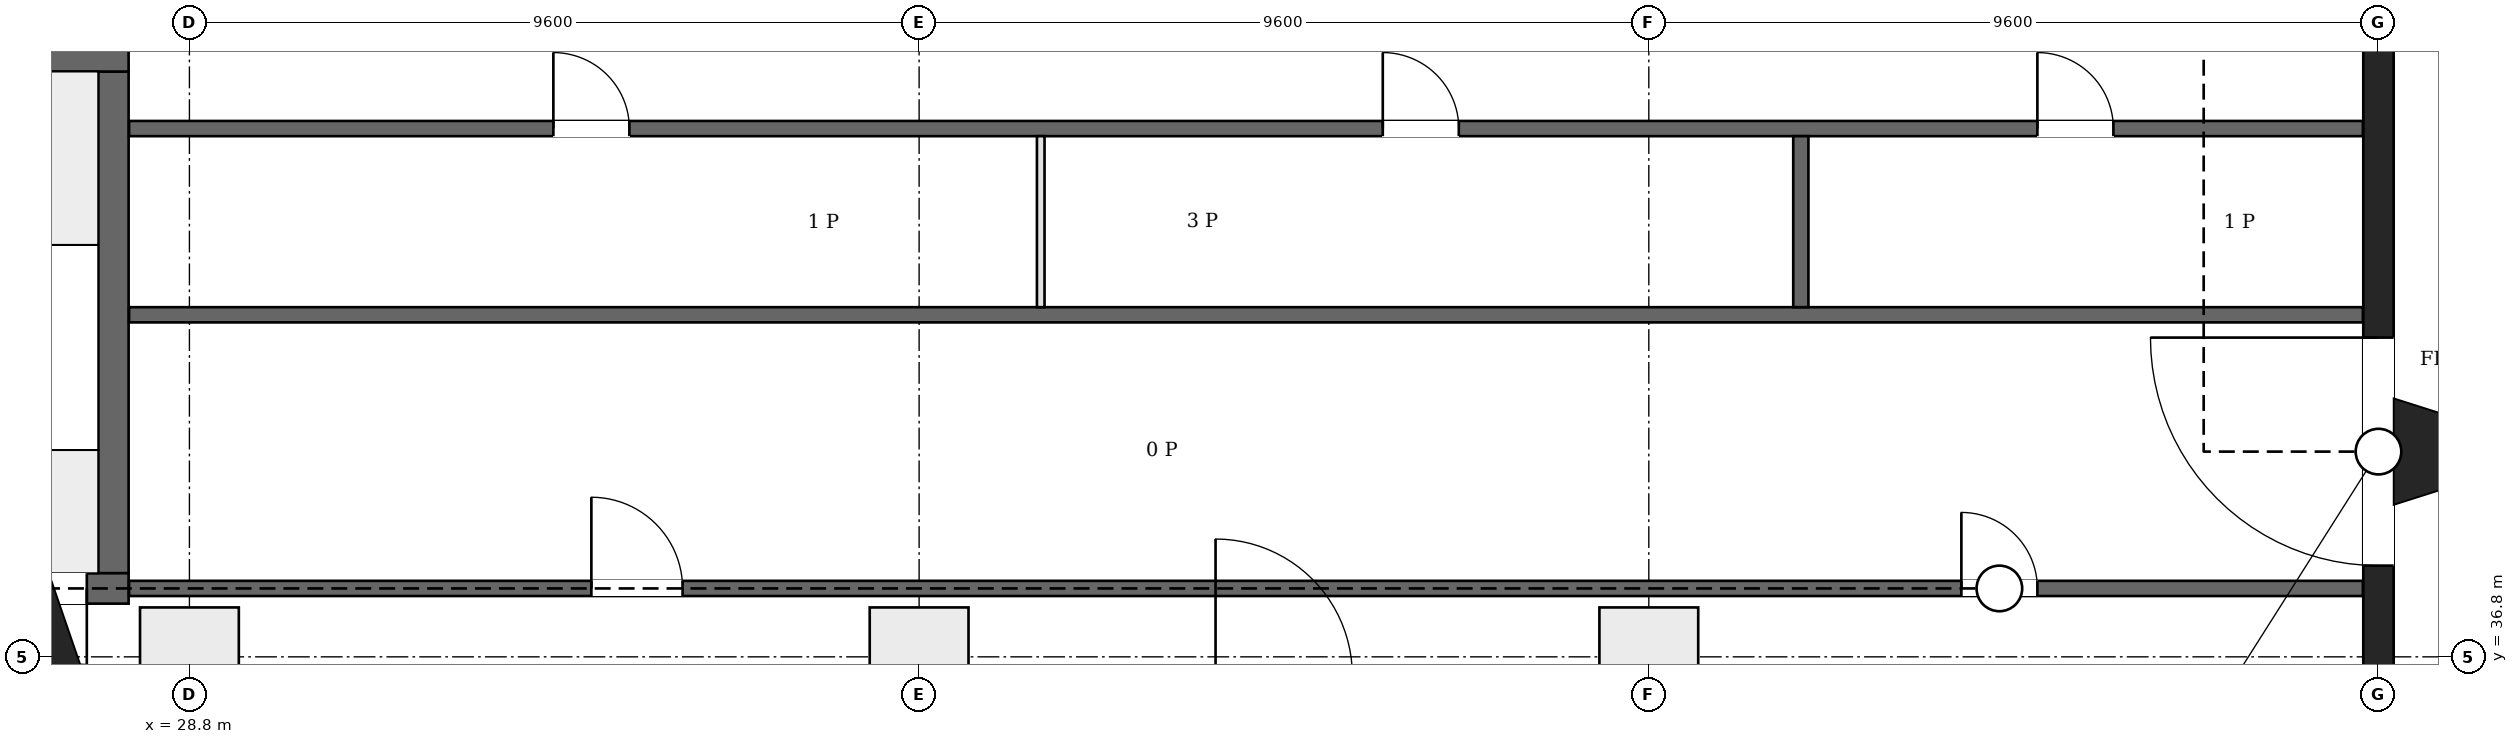
"""IFC4 building model, lengths in metres.
Left out: names, types, materials, properties, quantities, classifications, styles, units other than length and angle.
Written with IfcOpenShell. Run it as: python <this file> out.ifc"""

import sys

from ifc_helpers import new_model, si_unit, direction, frame, frame_2d, origin, origin_2d, place, context, subcontext, project, spatial, rectangle, extrude, element, fill, save


model = new_model("IFC4")
c1 = context("Model", 3, precision=1e-05, world=origin(), true_north=direction((0.0, 1.0)))
c2 = subcontext(c1, "Body", "Model", "MODEL_VIEW")
j1 = project(units=[si_unit("LENGTHUNIT", "METRE"), si_unit("PLANEANGLEUNIT", "RADIAN")], contexts=[c1])
p1 = place(None, origin())
s1 = spatial("IfcSite", under=j1, at=p1, CompositionType="ELEMENT")
p2 = place(p1, origin())
s2 = spatial("IfcBuilding", under=s1, at=p2, CompositionType="ELEMENT")
p3 = place(p2, origin())
s3 = spatial("IfcBuildingStorey", under=s2, at=p3, CompositionType="ELEMENT", Elevation=0.0)
p4 = place(p3, frame((57.6, -0.2, 0.0), z_axis=(0.0, 0.0, 1.0), x_axis=(0.0, 1.0, 0.0)))
e1 = element("IfcWall", 1, at=p4, inside=s3, PredefinedType="SHEAR", context=c2, shape_type="SweptSolid", body=[
    extrude(rectangle(XDim=46.88, YDim=0.4, at=frame_2d((23.44, 0.0))), origin(), (0.0, 0.0, 1.0), 6.5),
])
p5 = place(p4, frame((11.65, 0.0, 0.0)))
e2 = element("IfcOpeningElement", 2, at=p5, cuts=e1, PredefinedType="OPENING", context=c2, shape_type="SweptSolid", body=[
    extrude(rectangle(XDim=3.0, YDim=2.4, at=frame_2d((1.5, 1.2))), frame((0.0, 0.21, 0.0), z_axis=(0.0, -1.0, 0.0), x_axis=(1.0, 0.0, 0.0)), (0.0, 0.0, 1.0), 0.42),
])
p6 = place(p4, frame((38.2, 0.0, 0.0)))
e3 = element("IfcOpeningElement", 3, at=p6, cuts=e1, PredefinedType="OPENING", context=c2, shape_type="SweptSolid", body=[
    extrude(rectangle(XDim=3.0, YDim=2.4, at=frame_2d((1.5, 1.2))), frame((0.0, 0.21, 0.0), z_axis=(0.0, -1.0, 0.0), x_axis=(1.0, 0.0, 0.0)), (0.0, 0.0, 1.0), 0.42),
])
p7 = place(p3, frame((23.8, 37.7, 0.0), z_axis=(0.0, 0.0, 1.0), x_axis=(1.0, 0.0, 0.0)))
e4 = element("IfcWall", 4, at=p7, inside=s3, PredefinedType="SHEAR", context=c2, shape_type="SweptSolid", body=[
    extrude(rectangle(XDim=4.2, YDim=0.4, at=frame_2d((2.1, 0.0))), origin(), (0.0, 0.0, 1.0), 6.5),
])
p8 = place(p7, frame((0.55, 0.0, 0.0)))
e5 = element("IfcOpeningElement", 5, at=p8, cuts=e4, PredefinedType="OPENING", context=c2, shape_type="SweptSolid", body=[
    extrude(rectangle(XDim=1.0, YDim=2.1, at=frame_2d((0.5, 1.05))), frame((0.0, 0.21, 0.0), z_axis=(0.0, -1.0, 0.0), x_axis=(1.0, 0.0, 0.0)), (0.0, 0.0, 1.0), 0.42),
])
p9 = place(p7, frame((2.65, 0.0, 0.0)))
e6 = element("IfcOpeningElement", 6, at=p9, cuts=e4, PredefinedType="OPENING", context=c2, shape_type="SweptSolid", body=[
    extrude(rectangle(XDim=1.0, YDim=2.1, at=frame_2d((0.5, 1.05))), frame((0.0, 0.21, 0.0), z_axis=(0.0, -1.0, 0.0), x_axis=(1.0, 0.0, 0.0)), (0.0, 0.0, 1.0), 0.42),
])
p10 = place(p3, frame((23.8, 44.7, 0.0), z_axis=(0.0, 0.0, 1.0), x_axis=(1.0, 0.0, 0.0)))
e7 = element("IfcWall", 7, at=p10, inside=s3, PredefinedType="SHEAR", context=c2, shape_type="SweptSolid", body=[
    extrude(rectangle(XDim=4.2, YDim=0.4, at=frame_2d((2.1, 0.0))), origin(), (0.0, 0.0, 1.0), 6.5),
])
p11 = place(p3, frame((27.8, 37.9, 0.0), z_axis=(0.0, 0.0, 1.0), x_axis=(0.0, 1.0, 0.0)))
e8 = element("IfcWall", 8, at=p11, inside=s3, PredefinedType="SHEAR", context=c2, shape_type="SweptSolid", body=[
    extrude(rectangle(XDim=6.6, YDim=0.4, at=frame_2d((3.3, 0.0))), origin(), (0.0, 0.0, 1.0), 6.5),
])
for number, where, z_axis, x_axis in (
    (9, (28.8, 36.8, 0.0), (0.0, 0.0, 1.0), (1.0, 0.0, 0.0)),
    (10, (38.4, 36.8, 0.0), (0.0, 0.0, 1.0), (1.0, 0.0, 0.0)),
    (11, (48.0, 36.8, 0.0), (0.0, 0.0, 1.0), (1.0, 0.0, 0.0)),
):
    element("IfcColumn", number, at=place(p3, frame(where, z_axis=z_axis, x_axis=x_axis)), inside=s3, PredefinedType="COLUMN", context=c2, shape_type="SweptSolid", body=[
        extrude(rectangle(XDim=1.3, YDim=1.3, at=origin_2d()), origin(), (0.0, 0.0, 1.0), 6.5),
    ])
p12 = place(p3, frame((28.006, 37.7, 0.0), z_axis=(0.0, 0.0, 1.0), x_axis=(1.0, 0.0, 0.0)))
e12 = element("IfcWall", 12, at=p12, inside=s3, PredefinedType="PARTITIONING", context=c2, shape_type="SweptSolid", body=[
    extrude(rectangle(XDim=29.388, YDim=0.2, at=frame_2d((14.694, 0.0))), origin(), (0.0, 0.0, 1.0), 6.15),
])
p13 = place(p12, frame((24.106, 0.0, 0.0)))
e13 = element("IfcOpeningElement", 13, at=p13, cuts=e12, PredefinedType="OPENING", context=c2, shape_type="SweptSolid", body=[
    extrude(rectangle(XDim=1.0, YDim=2.1, at=frame_2d((0.5, 1.05))), frame((0.0, 0.11, 0.0), z_axis=(0.0, -1.0, 0.0), x_axis=(1.0, 0.0, 0.0)), (0.0, 0.0, 1.0), 0.22),
])
p14 = place(p12, frame((6.082, 0.0, 0.0)))
e14 = element("IfcOpeningElement", 14, at=p14, cuts=e12, PredefinedType="OPENING", context=c2, shape_type="SweptSolid", body=[
    extrude(rectangle(XDim=1.2, YDim=2.1, at=frame_2d((0.6, 1.05))), frame((0.0, 0.11, 0.0), z_axis=(0.0, -1.0, 0.0), x_axis=(1.0, 0.0, 0.0)), (0.0, 0.0, 1.0), 0.22),
])
p15 = place(p3, frame((28.006, 41.3, 0.0), z_axis=(0.0, 0.0, 1.0), x_axis=(1.0, 0.0, 0.0)))
e15 = element("IfcWall", 15, at=p15, inside=s3, PredefinedType="PARTITIONING", context=c2, shape_type="SweptSolid", body=[
    extrude(rectangle(XDim=29.388, YDim=0.2, at=frame_2d((14.694, 0.0))), origin(), (0.0, 0.0, 1.0), 6.15),
])
p16 = place(p3, frame((28.006, 43.75, 0.0), z_axis=(0.0, 0.0, 1.0), x_axis=(1.0, 0.0, 0.0)))
e16 = element("IfcWall", 16, at=p16, inside=s3, PredefinedType="PARTITIONING", context=c2, shape_type="SweptSolid", body=[
    extrude(rectangle(XDim=29.388, YDim=0.2, at=frame_2d((14.694, 0.0))), origin(), (0.0, 0.0, 1.0), 6.15),
])
p17 = place(p16, frame((5.582, 0.0, 0.0)))
e17 = element("IfcOpeningElement", 17, at=p17, cuts=e16, PredefinedType="OPENING", context=c2, shape_type="SweptSolid", body=[
    extrude(rectangle(XDim=1.0, YDim=2.1, at=frame_2d((0.5, 1.05))), frame((0.0, 0.11, 0.0), z_axis=(0.0, -1.0, 0.0), x_axis=(1.0, 0.0, 0.0)), (0.0, 0.0, 1.0), 0.22),
])
p18 = place(p16, frame((16.494, 0.0, 0.0)))
e18 = element("IfcOpeningElement", 18, at=p18, cuts=e16, PredefinedType="OPENING", context=c2, shape_type="SweptSolid", body=[
    extrude(rectangle(XDim=1.0, YDim=2.1, at=frame_2d((0.5, 1.05))), frame((0.0, 0.11, 0.0), z_axis=(0.0, -1.0, 0.0), x_axis=(1.0, 0.0, 0.0)), (0.0, 0.0, 1.0), 0.22),
])
p19 = place(p16, frame((25.106, 0.0, 0.0)))
e19 = element("IfcOpeningElement", 19, at=p19, cuts=e16, PredefinedType="OPENING", context=c2, shape_type="SweptSolid", body=[
    extrude(rectangle(XDim=1.0, YDim=2.1, at=frame_2d((0.5, 1.05))), frame((0.0, 0.11, 0.0), z_axis=(0.0, -1.0, 0.0), x_axis=(1.0, 0.0, 0.0)), (0.0, 0.0, 1.0), 0.22),
])
p20 = place(p3, frame((40.0, 41.4, 0.0), z_axis=(0.0, 0.0, 1.0), x_axis=(0.0, 1.0, 0.0)))
e20 = element("IfcWall", 20, at=p20, inside=s3, PredefinedType="PARTITIONING", context=c2, shape_type="SweptSolid", body=[
    extrude(rectangle(XDim=2.25, YDim=0.1, at=frame_2d((1.125, 0.0))), origin(), (0.0, 0.0, 1.0), 6.15),
])
p21 = place(p3, frame((50.0, 41.4, 0.0), z_axis=(0.0, 0.0, 1.0), x_axis=(0.0, 1.0, 0.0)))
e21 = element("IfcWall", 21, at=p21, inside=s3, PredefinedType="PARTITIONING", context=c2, shape_type="SweptSolid", body=[
    extrude(rectangle(XDim=2.25, YDim=0.2, at=frame_2d((1.125, 0.0))), origin(), (0.0, 0.0, 1.0), 6.15),
])
p22 = place(p6, frame((3.0, 0.0, 0.0), z_axis=(0.0, 0.0, 1.0), x_axis=(-1.0, 0.0, 0.0)))
e22 = element("IfcDoor", 22, at=p22, inside=s3, OperationType="DOUBLE_DOOR_SINGLE_SWING", PredefinedType="DOOR", context=c2, shape_type="SweptSolid", body=[
    extrude(rectangle(XDim=3.0, YDim=2.4, at=frame_2d((1.5, 1.2))), frame((0.0, 0.025, 0.0), z_axis=(0.0, -1.0, 0.0), x_axis=(1.0, 0.0, 0.0)), (0.0, 0.0, 1.0), 0.05),
])
fill(e3, e22)
p23 = place(p9, origin())
e23 = element("IfcDoor", 23, at=p23, inside=s3, OperationType="SINGLE_SWING_RIGHT", PredefinedType="DOOR", context=c2, shape_type="SweptSolid", body=[
    extrude(rectangle(XDim=1.0, YDim=2.1, at=frame_2d((0.5, 1.05))), frame((0.0, 0.025, 0.0), z_axis=(0.0, -1.0, 0.0), x_axis=(1.0, 0.0, 0.0)), (0.0, 0.0, 1.0), 0.05),
])
fill(e6, e23)
p24 = place(p13, origin())
e24 = element("IfcDoor", 24, at=p24, inside=s3, OperationType="SINGLE_SWING_RIGHT", PredefinedType="DOOR", context=c2, shape_type="SweptSolid", body=[
    extrude(rectangle(XDim=1.0, YDim=2.1, at=frame_2d((0.5, 1.05))), frame((0.0, 0.025, 0.0), z_axis=(0.0, -1.0, 0.0), x_axis=(1.0, 0.0, 0.0)), (0.0, 0.0, 1.0), 0.05),
])
fill(e13, e24)
p25 = place(p17, origin())
e25 = element("IfcDoor", 25, at=p25, inside=s3, OperationType="SINGLE_SWING_RIGHT", PredefinedType="DOOR", context=c2, shape_type="SweptSolid", body=[
    extrude(rectangle(XDim=1.0, YDim=2.1, at=frame_2d((0.5, 1.05))), frame((0.0, 0.025, 0.0), z_axis=(0.0, -1.0, 0.0), x_axis=(1.0, 0.0, 0.0)), (0.0, 0.0, 1.0), 0.05),
])
fill(e17, e25)
p26 = place(p18, origin())
e26 = element("IfcDoor", 26, at=p26, inside=s3, OperationType="SINGLE_SWING_LEFT", PredefinedType="DOOR", context=c2, shape_type="SweptSolid", body=[
    extrude(rectangle(XDim=1.0, YDim=2.1, at=frame_2d((0.5, 1.05))), frame((0.0, 0.025, 0.0), z_axis=(0.0, -1.0, 0.0), x_axis=(1.0, 0.0, 0.0)), (0.0, 0.0, 1.0), 0.05),
])
fill(e18, e26)
p27 = place(p19, origin())
e27 = element("IfcDoor", 27, at=p27, inside=s3, OperationType="SINGLE_SWING_RIGHT", PredefinedType="DOOR", context=c2, shape_type="SweptSolid", body=[
    extrude(rectangle(XDim=1.0, YDim=2.1, at=frame_2d((0.5, 1.05))), frame((0.0, 0.025, 0.0), z_axis=(0.0, -1.0, 0.0), x_axis=(1.0, 0.0, 0.0)), (0.0, 0.0, 1.0), 0.05),
])
fill(e19, e27)
p28 = place(p14, origin())
e28 = element("IfcDoor", 28, at=p28, inside=s3, OperationType="SINGLE_SWING_LEFT", PredefinedType="DOOR", context=c2, shape_type="SweptSolid", body=[
    extrude(rectangle(XDim=1.2, YDim=2.1, at=frame_2d((0.6, 1.05))), frame((0.0, 0.025, 0.0), z_axis=(0.0, -1.0, 0.0), x_axis=(1.0, 0.0, 0.0)), (0.0, 0.0, 1.0), 0.05),
])
fill(e14, e28)
save(model, sys.argv[1])
